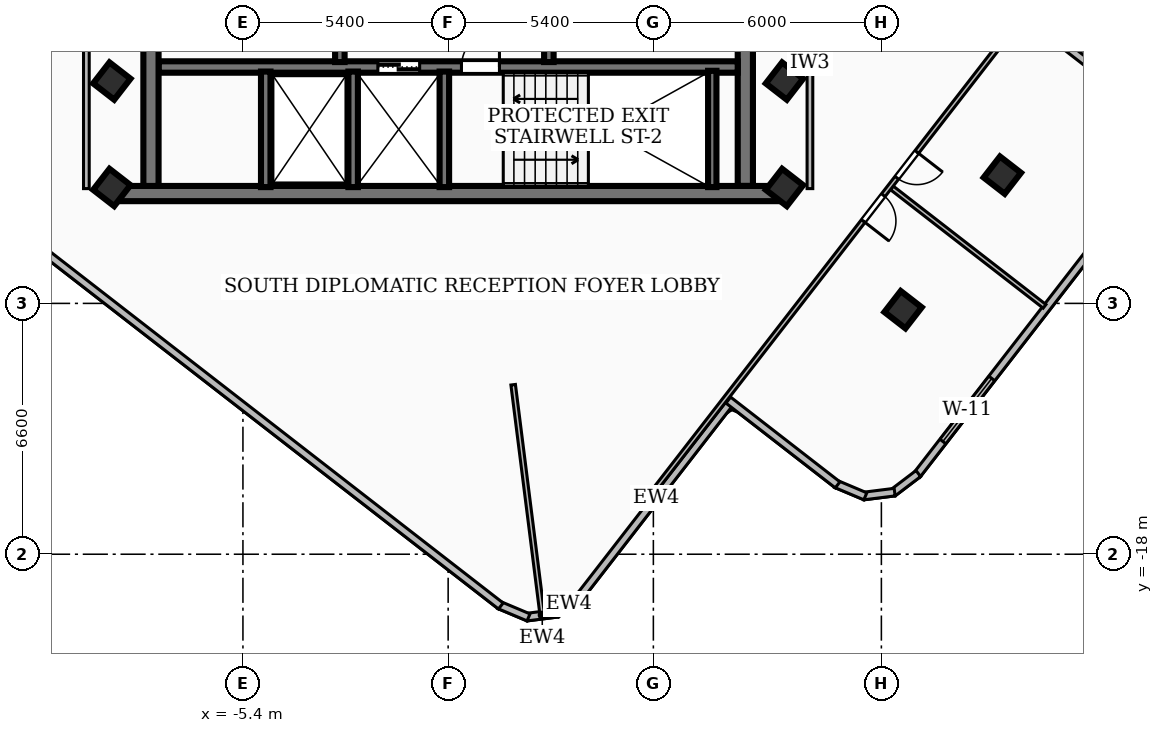
"""IFC4 building model, lengths in metres.
Left out: names, types, materials, properties, quantities, classifications, styles, units other than length and angle.
Written with IfcOpenShell. Run it as: python <this file> out.ifc"""

import sys

from ifc_helpers import new_model, si_unit, direction, frame, frame_2d, origin, origin_2d, place, context, subcontext, project, spatial, rectangle, extrude, element, fill, save


model = new_model("IFC4")
c1 = context("Model", 3, precision=1e-05, world=origin(), true_north=direction((0.0, 1.0)))
c2 = subcontext(c1, "Body", "Model", "MODEL_VIEW")
j1 = project(units=[si_unit("LENGTHUNIT", "METRE"), si_unit("PLANEANGLEUNIT", "RADIAN")], contexts=[c1])
p1 = place(None, origin())
s1 = spatial("IfcSite", under=j1, at=p1, CompositionType="ELEMENT")
p2 = place(p1, origin())
s2 = spatial("IfcBuilding", under=s1, at=p2, CompositionType="ELEMENT")
p3 = place(p2, frame((0.0, 0.0, 261.18)))
s3 = spatial("IfcBuildingStorey", under=s2, at=p3, CompositionType="ELEMENT", Elevation=261.18)
p4 = place(p3, frame((8.78, -8.51, 0.0), z_axis=(0.0, 0.0, 1.0), x_axis=(-1.0, 0.0, 0.0)))
e1 = element("IfcWall", 1, at=p4, inside=s3, PredefinedType="SHEAR", context=c2, shape_type="SweptSolid", body=[
    extrude(rectangle(XDim=17.56, YDim=0.4, at=frame_2d((8.78, 0.0))), origin(), (0.0, 0.0, 1.0), 3.16),
])
for number, where, z_axis, x_axis in (
    (2, (-7.82, -8.31, 0.0), (0.0, 0.0, 1.0), (0.0, 1.0, 0.0)),
    (3, (7.82, -1.95, 0.0), (0.0, 0.0, 1.0), (0.0, -1.0, 0.0)),
):
    element("IfcWall", number, at=place(p3, frame(where, z_axis=z_axis, x_axis=x_axis)), inside=s3, PredefinedType="SHEAR", context=c2, shape_type="SweptSolid", body=[
        extrude(rectangle(XDim=6.36, YDim=0.4, at=frame_2d((3.18, 0.0))), origin(), (0.0, 0.0, 1.0), 3.16),
    ])
p5 = place(p3, frame((-7.62, -5.18, 0.0), z_axis=(0.0, 0.0, 1.0), x_axis=(1.0, 0.0, 0.0)))
e4 = element("IfcWall", 4, at=p5, inside=s3, PredefinedType="SOLIDWALL", context=c2, shape_type="SweptSolid", body=[
    extrude(rectangle(XDim=15.24, YDim=0.3, at=frame_2d((7.62, 0.0))), origin(), (0.0, 0.0, 1.0), 3.16),
])
p6 = place(p5, frame((5.77, 0.0, 0.0)))
e5 = element("IfcOpeningElement", 5, at=p6, cuts=e4, PredefinedType="OPENING", context=c2, shape_type="SweptSolid", body=[
    extrude(rectangle(XDim=1.1, YDim=2.15, at=frame_2d((0.55, 1.075))), frame((0.0, 0.16, 0.0), z_axis=(0.0, -1.0, 0.0), x_axis=(1.0, 0.0, 0.0)), (0.0, 0.0, 1.0), 0.32),
])
p7 = place(p5, frame((7.97, 0.0, 0.0)))
e6 = element("IfcOpeningElement", 6, at=p7, cuts=e4, PredefinedType="OPENING", context=c2, shape_type="SweptSolid", body=[
    extrude(rectangle(XDim=1.0, YDim=2.1, at=frame_2d((0.5, 1.05))), frame((0.0, 0.16, 0.0), z_axis=(0.0, -1.0, 0.0), x_axis=(1.0, 0.0, 0.0)), (0.0, 0.0, 1.0), 0.32),
])
p8 = place(p3, frame((6.95, -8.34, 0.0), z_axis=(0.0, 0.0, 1.0), x_axis=(0.0, 1.0, 0.0)))
e7 = element("IfcWall", 7, at=p8, inside=s3, PredefinedType="SOLIDWALL", context=c2, shape_type="SweptSolid", body=[
    extrude(rectangle(XDim=3.06, YDim=0.22, at=frame_2d((1.53, 0.0))), origin(), (0.0, 0.0, 1.0), 3.16),
])
for number, where, z_axis, x_axis in (
    (8, (-0.1, -8.34, 0.0), (0.0, 0.0, 1.0), (0.0, 1.0, 0.0)),
    (9, (-2.5, -8.34, 0.0), (0.0, 0.0, 1.0), (0.0, 1.0, 0.0)),
    (10, (-4.8, -8.34, 0.0), (0.0, 0.0, 1.0), (0.0, 1.0, 0.0)),
):
    element("IfcWall", number, at=place(p3, frame(where, z_axis=z_axis, x_axis=x_axis)), inside=s3, PredefinedType="SOLIDWALL", context=c2, shape_type="SweptSolid", body=[
        extrude(rectangle(XDim=3.04, YDim=0.25, at=frame_2d((1.52, 0.0))), origin(), (0.0, 0.0, 1.0), 3.16),
    ])
for number, where, z_axis, x_axis in (
    (11, (-2.85, -5.05, 0.0), (0.0, 0.0, 1.0), (0.0, 1.0, 0.0)),
    (12, (2.65, -5.05, 0.0), (0.0, 0.0, 1.0), (0.0, 1.0, 0.0)),
):
    element("IfcWall", number, at=place(p3, frame(where, z_axis=z_axis, x_axis=x_axis)), inside=s3, PredefinedType="SOLIDWALL", context=c2, shape_type="SweptSolid", body=[
        extrude(rectangle(XDim=3.07, YDim=0.25, at=frame_2d((1.535, 0.0))), origin(), (0.0, 0.0, 1.0), 3.16),
    ])
for number, where, z_axis, x_axis in (
    (13, (-8.85, -5.55, 0.0), (0.0, 0.0, 1.0), (0.613, 0.79, 0.0)),
    (14, (8.85, -5.55, 0.0), (0.0, 0.0, 1.0), (0.613, 0.79, 0.0)),
    (15, (8.85, -8.35, 0.0), (0.0, 0.0, 1.0), (0.613, 0.79, 0.0)),
    (16, (-8.85, -8.35, 0.0), (0.0, 0.0, 1.0), (0.613, 0.79, 0.0)),
    (17, (11.971, -11.566, 0.0), (0.0, 0.0, 1.0), (0.613, 0.79, 0.0)),
    (18, (14.583, -8.026, 0.0), (0.0, 0.0, 1.0), (0.613, 0.79, 0.0)),
):
    element("IfcColumn", number, at=place(p3, frame(where, z_axis=z_axis, x_axis=x_axis)), inside=s3, PredefinedType="COLUMN", context=c2, shape_type="SweptSolid", body=[
        extrude(rectangle(XDim=0.7, YDim=0.7, at=origin_2d()), origin(), (0.0, 0.0, 1.0), 3.42),
    ])
p9 = place(p3, frame((7.483, -13.93, 0.0), z_axis=(0.0, 0.0, 1.0), x_axis=(-0.612826373036, -0.790217588081, 0.0)))
e19 = element("IfcWall", 19, at=p9, inside=s3, PredefinedType="SOLIDWALL", context=c2, shape_type="SweptSolid", body=[
    extrude(rectangle(XDim=6.542, YDim=0.2, at=frame_2d((3.271, 0.0))), origin(), (0.0, 0.0, 1.0), 3.16),
])
p10 = place(p3, frame((3.509, -19.064, 0.0), z_axis=(0.0, 0.0, 1.0), x_axis=(-0.797053904317, -0.603908166539, 0.0)))
e20 = element("IfcWall", 20, at=p10, inside=s3, PredefinedType="SOLIDWALL", context=c2, shape_type="SweptSolid", body=[
    extrude(rectangle(XDim=0.838, YDim=0.2, at=frame_2d((0.419, 0.0))), origin(), (0.0, 0.0, 1.0), 3.16),
])
p11 = place(p3, frame((2.886, -19.552, 0.0), z_axis=(0.0, 0.0, 1.0), x_axis=(-0.992182038023, -0.124799052175, 0.0)))
e21 = element("IfcWall", 21, at=p11, inside=s3, PredefinedType="SOLIDWALL", context=c2, shape_type="SweptSolid", body=[
    extrude(rectangle(XDim=0.825, YDim=0.2, at=frame_2d((0.413, 0.0))), origin(), (0.0, 0.0, 1.0), 3.16),
])
p12 = place(p3, frame((2.115, -19.662, 0.0), z_axis=(0.0, 0.0, 1.0), x_axis=(-0.921569528133, 0.388213349612, 0.0)))
e22 = element("IfcWall", 22, at=p12, inside=s3, PredefinedType="SOLIDWALL", context=c2, shape_type="SweptSolid", body=[
    extrude(rectangle(XDim=0.838, YDim=0.2, at=frame_2d((0.419, 0.0))), origin(), (0.0, 0.0, 1.0), 3.16),
])
p13 = place(p3, frame((1.386, -19.362, 0.0), z_axis=(0.0, 0.0, 1.0), x_axis=(-0.790191227086, 0.612860363081, 0.0)))
e23 = element("IfcWall", 23, at=p13, inside=s3, PredefinedType="SOLIDWALL", context=c2, shape_type="SweptSolid", body=[
    extrude(rectangle(XDim=25.924, YDim=0.2, at=frame_2d((12.962, 0.0))), origin(), (0.0, 0.0, 1.0), 3.16),
])
p14 = place(p13, frame((19.021, 0.0, 0.85)))
e24 = element("IfcOpeningElement", 24, at=p14, cuts=e23, PredefinedType="OPENING", context=c2, shape_type="SweptSolid", body=[
    extrude(rectangle(XDim=2.4, YDim=1.85, at=frame_2d((1.2, 0.925))), frame((0.0, 0.11, 0.0), z_axis=(0.0, -1.0, 0.0), x_axis=(1.0, 0.0, 0.0)), (0.0, 0.0, 1.0), 0.22),
])
p15 = place(p3, frame((15.215, -3.829, 0.0), z_axis=(0.0, 0.0, 1.0), x_axis=(0.790311198889, -0.612705646221, 0.0)))
e25 = element("IfcWall", 25, at=p15, inside=s3, PredefinedType="SOLIDWALL", context=c2, shape_type="SweptSolid", body=[
    extrude(rectangle(XDim=3.643, YDim=0.2, at=frame_2d((1.821, 0.0))), origin(), (0.0, 0.0, 1.0), 3.16),
])
p16 = place(p3, frame((18.357, -8.149, 0.0), z_axis=(0.0, 0.0, 1.0), x_axis=(-0.612797548915, -0.790239940806, 0.0)))
e26 = element("IfcWall", 26, at=p16, inside=s3, PredefinedType="SOLIDWALL", context=c2, shape_type="SweptSolid", body=[
    extrude(rectangle(XDim=9.824, YDim=0.2, at=frame_2d((4.912, 0.0))), origin(), (0.0, 0.0, 1.0), 3.16),
])
p17 = place(p16, frame((6.612, 0.0, 0.85)))
e27 = element("IfcOpeningElement", 27, at=p17, cuts=e26, PredefinedType="OPENING", context=c2, shape_type="SweptSolid", body=[
    extrude(rectangle(XDim=2.1, YDim=1.6, at=frame_2d((1.05, 0.8))), frame((0.0, 0.11, 0.0), z_axis=(0.0, -1.0, 0.0), x_axis=(1.0, 0.0, 0.0)), (0.0, 0.0, 1.0), 0.22),
])
p18 = place(p3, frame((12.372, -15.877, 0.0), z_axis=(0.0, 0.0, 1.0), x_axis=(-0.796493049564, -0.60464768419, 0.0)))
e28 = element("IfcWall", 28, at=p18, inside=s3, PredefinedType="SOLIDWALL", context=c2, shape_type="SweptSolid", body=[
    extrude(rectangle(XDim=0.839, YDim=0.2, at=frame_2d((0.419, 0.0))), origin(), (0.0, 0.0, 1.0), 3.16),
])
p19 = place(p3, frame((11.749, -16.366, 0.0), z_axis=(0.0, 0.0, 1.0), x_axis=(-0.992182038023, -0.124799052175, 0.0)))
e29 = element("IfcWall", 29, at=p19, inside=s3, PredefinedType="SOLIDWALL", context=c2, shape_type="SweptSolid", body=[
    extrude(rectangle(XDim=0.825, YDim=0.2, at=frame_2d((0.413, 0.0))), origin(), (0.0, 0.0, 1.0), 3.16),
])
p20 = place(p3, frame((10.978, -16.476, 0.0), z_axis=(0.0, 0.0, 1.0), x_axis=(-0.921328331513, 0.388785423532, 0.0)))
e30 = element("IfcWall", 30, at=p20, inside=s3, PredefinedType="SOLIDWALL", context=c2, shape_type="SweptSolid", body=[
    extrude(rectangle(XDim=0.839, YDim=0.2, at=frame_2d((0.419, 0.0))), origin(), (0.0, 0.0, 1.0), 3.16),
])
p21 = place(p3, frame((10.248, -16.175, 0.0), z_axis=(0.0, 0.0, 1.0), x_axis=(-0.790239683444, 0.612797880797, 0.0)))
e31 = element("IfcWall", 31, at=p21, inside=s3, PredefinedType="SOLIDWALL", context=c2, shape_type="SweptSolid", body=[
    extrude(rectangle(XDim=3.641, YDim=0.2, at=frame_2d((1.82, 0.0))), origin(), (0.0, 0.0, 1.0), 3.16),
])
p22 = place(p3, frame((-9.52, -8.38, 0.0), z_axis=(0.0, 0.0, 1.0), x_axis=(0.0, 1.0, 0.0)))
e32 = element("IfcWall", 32, at=p22, inside=s3, PredefinedType="PARTITIONING", context=c2, shape_type="SweptSolid", body=[
    extrude(rectangle(XDim=6.63, YDim=0.15, at=frame_2d((3.315, 0.0))), origin(), (0.0, 0.0, 1.0), 3.16),
])
p23 = place(p3, frame((9.52, -8.38, 0.0), z_axis=(0.0, 0.0, 1.0), x_axis=(0.0, 1.0, 0.0)))
e33 = element("IfcWall", 33, at=p23, inside=s3, PredefinedType="PARTITIONING", context=c2, shape_type="SweptSolid", body=[
    extrude(rectangle(XDim=6.63, YDim=0.15, at=frame_2d((3.315, 0.0))), origin(), (0.0, 0.0, 1.0), 2.53),
])
p24 = place(p3, frame((1.711, -13.54, 0.0), z_axis=(0.0, 0.0, 1.0), x_axis=(0.125366398214, -0.992110511082, 0.0)))
e34 = element("IfcWall", 34, at=p24, inside=s3, PredefinedType="PARTITIONING", context=c2, shape_type="SweptSolid", body=[
    extrude(rectangle(XDim=6.047, YDim=0.12, at=frame_2d((3.023, 0.0))), origin(), (0.0, 0.0, 1.0), 3.16),
])
p25 = place(p3, frame((11.676, -8.361, 0.0), z_axis=(0.0, 0.0, 1.0), x_axis=(0.790227868115, -0.612813117071, 0.0)))
e35 = element("IfcWall", 35, at=p25, inside=s3, PredefinedType="PARTITIONING", context=c2, shape_type="SweptSolid", body=[
    extrude(rectangle(XDim=5.085, YDim=0.12, at=frame_2d((2.542, 0.0))), origin(), (0.0, 0.0, 1.0), 3.16),
])
p26 = place(p3, frame((17.555, -0.683, 0.0), z_axis=(0.0, 0.0, 1.0), x_axis=(-0.61291959311, -0.790145285617, 0.0)))
e36 = element("IfcWall", 36, at=p26, inside=s3, PredefinedType="PARTITIONING", context=c2, shape_type="SweptSolid", body=[
    extrude(rectangle(XDim=20.239, YDim=0.12, at=frame_2d((10.12, 0.0))), origin(), (0.0, 0.0, 1.0), 2.53),
])
p27 = place(p26, frame((9.96, 0.0, 0.0)))
e37 = element("IfcOpeningElement", 37, at=p27, cuts=e36, PredefinedType="OPENING", context=c2, shape_type="SweptSolid", body=[
    extrude(rectangle(XDim=0.86, YDim=2.04, at=frame_2d((0.43, 1.02))), frame((0.0, 0.07, 0.0), z_axis=(0.0, -1.0, 0.0), x_axis=(1.0, 0.0, 0.0)), (0.0, 0.0, 1.0), 0.14),
])
p28 = place(p26, frame((8.52, 0.0, 0.0)))
e38 = element("IfcOpeningElement", 38, at=p28, cuts=e36, PredefinedType="OPENING", context=c2, shape_type="SweptSolid", body=[
    extrude(rectangle(XDim=0.86, YDim=2.04, at=frame_2d((0.43, 1.02))), frame((0.0, 0.07, 0.0), z_axis=(0.0, -1.0, 0.0), x_axis=(1.0, 0.0, 0.0)), (0.0, 0.0, 1.0), 0.14),
])
p29 = place(p17, origin())
e39 = element("IfcWindow", 39, at=p29, inside=s3, PartitioningType="SINGLE_PANEL", PredefinedType="WINDOW", context=c2, shape_type="SweptSolid", body=[
    extrude(rectangle(XDim=2.1, YDim=1.6, at=frame_2d((1.05, 0.8))), frame((0.0, 0.03, 0.0), z_axis=(0.0, -1.0, 0.0), x_axis=(1.0, 0.0, 0.0)), (0.0, 0.0, 1.0), 0.06),
])
fill(e27, e39)
p30 = place(p6, origin())
e40 = element("IfcDoor", 40, at=p30, inside=s3, OperationType="DOUBLE_DOOR_SLIDING", PredefinedType="DOOR", context=c2, shape_type="SweptSolid", body=[
    extrude(rectangle(XDim=1.1, YDim=2.15, at=frame_2d((0.55, 1.075))), frame((0.0, 0.025, 0.0), z_axis=(0.0, -1.0, 0.0), x_axis=(1.0, 0.0, 0.0)), (0.0, 0.0, 1.0), 0.05),
])
fill(e5, e40)
p31 = place(p7, origin())
e41 = element("IfcDoor", 41, at=p31, inside=s3, OperationType="SINGLE_SWING_RIGHT", PredefinedType="DOOR", context=c2, shape_type="SweptSolid", body=[
    extrude(rectangle(XDim=1.0, YDim=2.1, at=frame_2d((0.5, 1.05))), frame((0.0, 0.025, 0.0), z_axis=(0.0, -1.0, 0.0), x_axis=(1.0, 0.0, 0.0)), (0.0, 0.0, 1.0), 0.05),
])
fill(e6, e41)
p32 = place(p27, origin())
e42 = element("IfcDoor", 42, at=p32, inside=s3, OperationType="SINGLE_SWING_RIGHT", PredefinedType="DOOR", context=c2, shape_type="SweptSolid", body=[
    extrude(rectangle(XDim=0.86, YDim=2.04, at=frame_2d((0.43, 1.02))), frame((0.0, 0.025, 0.0), z_axis=(0.0, -1.0, 0.0), x_axis=(1.0, 0.0, 0.0)), (0.0, 0.0, 1.0), 0.05),
])
fill(e37, e42)
p33 = place(p28, origin())
e43 = element("IfcDoor", 43, at=p33, inside=s3, OperationType="SINGLE_SWING_LEFT", PredefinedType="DOOR", context=c2, shape_type="SweptSolid", body=[
    extrude(rectangle(XDim=0.86, YDim=2.04, at=frame_2d((0.43, 1.02))), frame((0.0, 0.025, 0.0), z_axis=(0.0, -1.0, 0.0), x_axis=(1.0, 0.0, 0.0)), (0.0, 0.0, 1.0), 0.05),
])
fill(e38, e43)
save(model, sys.argv[1])
